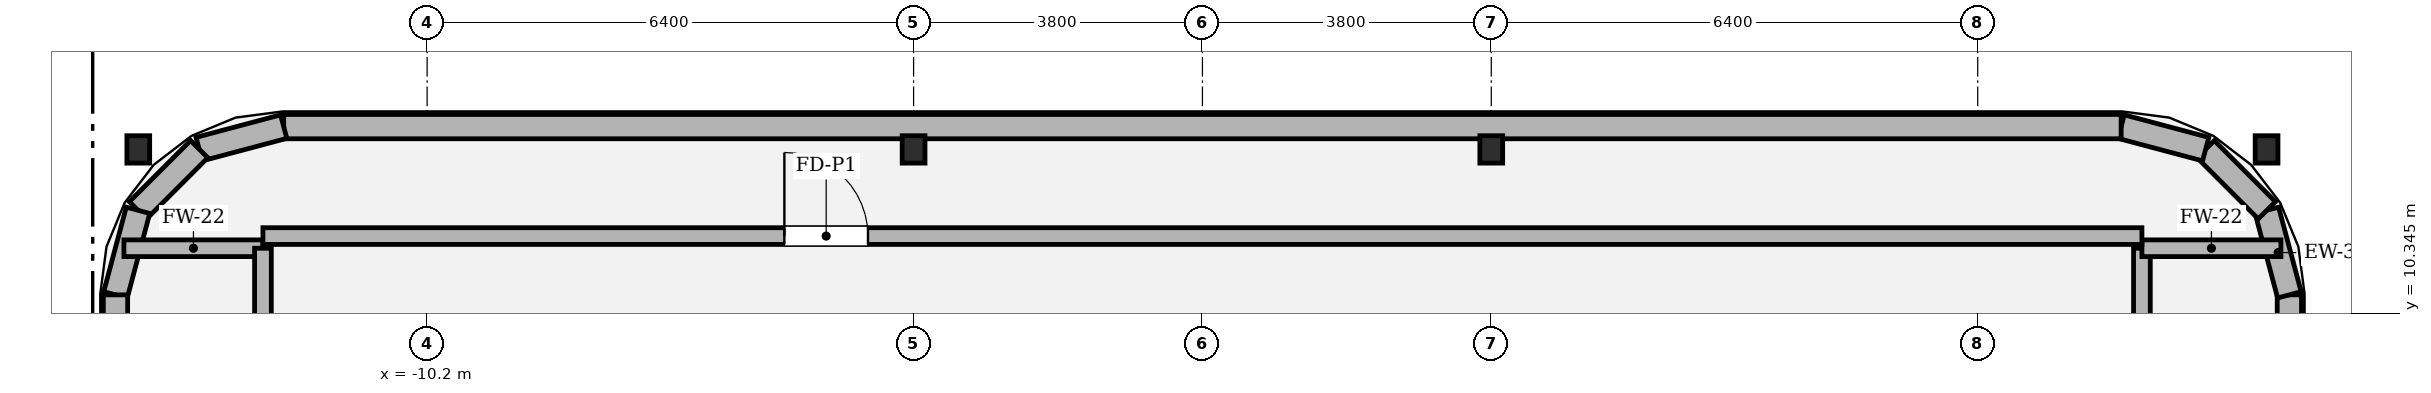
"""IFC4 building model, lengths in metres.
Left out: names, types, materials, properties, quantities, classifications, styles, units other than length and angle.
Written with IfcOpenShell. Run it as: python <this file> out.ifc"""

import sys

from ifc_helpers import new_model, si_unit, direction, frame, frame_2d, origin, origin_2d, place, context, subcontext, project, spatial, rectangle, i_section, extrude, element, fill, save


model = new_model("IFC4")
c1 = context("Model", 3, precision=1e-05, world=origin(), true_north=direction((0.0, 1.0)))
c2 = subcontext(c1, "Body", "Model", "MODEL_VIEW")
j1 = project(units=[si_unit("LENGTHUNIT", "METRE"), si_unit("PLANEANGLEUNIT", "RADIAN")], contexts=[c1])
p1 = place(None, origin())
s1 = spatial("IfcSite", under=j1, at=p1, CompositionType="ELEMENT")
p2 = place(p1, origin())
s2 = spatial("IfcBuilding", under=s1, at=p2, CompositionType="ELEMENT")
p3 = place(p2, frame((0.0, 0.0, 366.3)))
s3 = spatial("IfcBuildingStorey", under=s2, at=p3, CompositionType="ELEMENT", Elevation=366.3)
for number, where, z_axis, x_axis in (
    (1, (-3.8, 12.5, 0.0), (0.0, 0.0, 1.0), (1.0, 0.0, 0.0)),
    (2, (3.8, 12.5, 0.0), (0.0, 0.0, 1.0), (1.0, 0.0, 0.0)),
    (3, (14.0, 12.5, 0.0), (0.0, 0.0, 1.0), (1.0, 0.0, 0.0)),
    (4, (-14.0, 12.5, 0.0), (0.0, 0.0, 1.0), (1.0, 0.0, 0.0)),
):
    element("IfcColumn", number, at=place(p3, frame(where, z_axis=z_axis, x_axis=x_axis)), inside=s3, PredefinedType="COLUMN", context=c2, shape_type="SweptSolid", body=[
        extrude(i_section(OverallWidth=0.3, OverallDepth=0.36, WebThickness=0.012, FlangeThickness=0.022, FilletRadius=0.018, at=origin_2d()), origin(), (0.0, 0.0, 1.0), 4.498),
    ])
p4 = place(p3, frame((14.3, -10.587, 0.0), z_axis=(0.0, 0.0, 1.0), x_axis=(0.0, 1.0, 0.0)))
e5 = element("IfcWall", 5, at=p4, inside=s3, PredefinedType="SOLIDWALL", context=c2, shape_type="SweptSolid", body=[
    extrude(rectangle(XDim=21.174, YDim=0.32, at=frame_2d((10.587, 0.0))), origin(), (0.0, 0.0, 1.0), 3.924),
])
p5 = place(p3, frame((14.3, 10.587, 0.0), z_axis=(0.0, 0.0, 1.0), x_axis=(-0.25727979053, 0.966336954372, 0.0)))
e6 = element("IfcWall", 6, at=p5, inside=s3, PredefinedType="SOLIDWALL", context=c2, shape_type="SweptSolid", body=[
    extrude(rectangle(XDim=1.151, YDim=0.32, at=frame_2d((0.576, 0.0))), origin(), (0.0, 0.0, 1.0), 3.924),
])
p6 = place(p3, frame((14.004, 11.699, 0.0), z_axis=(0.0, 0.0, 1.0), x_axis=(-0.707106781187, 0.707106781187, 0.0)))
e7 = element("IfcWall", 7, at=p6, inside=s3, PredefinedType="SOLIDWALL", context=c2, shape_type="SweptSolid", body=[
    extrude(rectangle(XDim=1.138, YDim=0.32, at=frame_2d((0.569, 0.0))), origin(), (0.0, 0.0, 1.0), 3.924),
])
p7 = place(p3, frame((13.199, 12.504, 0.0), z_axis=(0.0, 0.0, 1.0), x_axis=(-0.966336954372, 0.25727979053, 0.0)))
e8 = element("IfcWall", 8, at=p7, inside=s3, PredefinedType="SOLIDWALL", context=c2, shape_type="SweptSolid", body=[
    extrude(rectangle(XDim=1.151, YDim=0.32, at=frame_2d((0.576, 0.0))), origin(), (0.0, 0.0, 1.0), 3.924),
])
p8 = place(p3, frame((12.087, 12.8, 0.0), z_axis=(0.0, 0.0, 1.0), x_axis=(-1.0, 0.0, 0.0)))
e9 = element("IfcWall", 9, at=p8, inside=s3, PredefinedType="SOLIDWALL", context=c2, shape_type="SweptSolid", body=[
    extrude(rectangle(XDim=24.174, YDim=0.32, at=frame_2d((12.087, 0.0))), origin(), (0.0, 0.0, 1.0), 3.924),
])
p9 = place(p3, frame((-12.087, 12.8, 0.0), z_axis=(0.0, 0.0, 1.0), x_axis=(-0.966336954372, -0.25727979053, 0.0)))
e10 = element("IfcWall", 10, at=p9, inside=s3, PredefinedType="SOLIDWALL", context=c2, shape_type="SweptSolid", body=[
    extrude(rectangle(XDim=1.151, YDim=0.32, at=frame_2d((0.576, 0.0))), origin(), (0.0, 0.0, 1.0), 3.924),
])
p10 = place(p3, frame((-13.199, 12.504, 0.0), z_axis=(0.0, 0.0, 1.0), x_axis=(-0.707106781187, -0.707106781187, 0.0)))
e11 = element("IfcWall", 11, at=p10, inside=s3, PredefinedType="SOLIDWALL", context=c2, shape_type="SweptSolid", body=[
    extrude(rectangle(XDim=1.138, YDim=0.32, at=frame_2d((0.569, 0.0))), origin(), (0.0, 0.0, 1.0), 3.924),
])
p11 = place(p3, frame((-14.004, 11.699, 0.0), z_axis=(0.0, 0.0, 1.0), x_axis=(-0.25727979053, -0.966336954372, 0.0)))
e12 = element("IfcWall", 12, at=p11, inside=s3, PredefinedType="SOLIDWALL", context=c2, shape_type="SweptSolid", body=[
    extrude(rectangle(XDim=1.151, YDim=0.32, at=frame_2d((0.576, 0.0))), origin(), (0.0, 0.0, 1.0), 3.924),
])
p12 = place(p3, frame((-14.3, 10.587, 0.0), z_axis=(0.0, 0.0, 1.0), x_axis=(0.0, -1.0, 0.0)))
e13 = element("IfcWall", 13, at=p12, inside=s3, PredefinedType="SOLIDWALL", context=c2, shape_type="SweptSolid", body=[
    extrude(rectangle(XDim=21.174, YDim=0.32, at=frame_2d((10.587, 0.0))), origin(), (0.0, 0.0, 1.0), 3.924),
])
p13 = place(p3, frame((-14.189, 11.2, 0.0), z_axis=(0.0, 0.0, 1.0), x_axis=(1.0, 0.0, 0.0)))
e14 = element("IfcWall", 14, at=p13, inside=s3, PredefinedType="SOLIDWALL", context=c2, shape_type="SweptSolid", body=[
    extrude(rectangle(XDim=1.829, YDim=0.22, at=frame_2d((0.915, 0.0))), origin(), (0.0, 0.0, 1.0), 3.924),
])
p14 = place(p3, frame((-12.36, 11.2, 0.0), z_axis=(0.0, 0.0, 1.0), x_axis=(0.0, -1.0, 0.0)))
e15 = element("IfcWall", 15, at=p14, inside=s3, PredefinedType="SOLIDWALL", context=c2, shape_type="SweptSolid", body=[
    extrude(rectangle(XDim=22.4, YDim=0.22, at=frame_2d((11.2, 0.0))), origin(), (0.0, 0.0, 1.0), 3.924),
])
p15 = place(p14, frame((10.65, 0.0, 0.0)))
e16 = element("IfcOpeningElement", 16, at=p15, cuts=e15, PredefinedType="OPENING", context=c2, shape_type="SweptSolid", body=[
    extrude(rectangle(XDim=1.1, YDim=2.2, at=frame_2d((0.55, 1.1))), frame((0.0, 0.12, 0.0), z_axis=(0.0, -1.0, 0.0), x_axis=(1.0, 0.0, 0.0)), (0.0, 0.0, 1.0), 0.24),
])
p16 = place(p3, frame((12.36, -11.2, 0.0), z_axis=(0.0, 0.0, 1.0), x_axis=(0.0, 1.0, 0.0)))
e17 = element("IfcWall", 17, at=p16, inside=s3, PredefinedType="SOLIDWALL", context=c2, shape_type="SweptSolid", body=[
    extrude(rectangle(XDim=22.4, YDim=0.22, at=frame_2d((11.2, 0.0))), origin(), (0.0, 0.0, 1.0), 3.924),
])
p17 = place(p16, frame((10.65, 0.0, 0.0)))
e18 = element("IfcOpeningElement", 18, at=p17, cuts=e17, PredefinedType="OPENING", context=c2, shape_type="SweptSolid", body=[
    extrude(rectangle(XDim=1.1, YDim=2.2, at=frame_2d((0.55, 1.1))), frame((0.0, 0.12, 0.0), z_axis=(0.0, -1.0, 0.0), x_axis=(1.0, 0.0, 0.0)), (0.0, 0.0, 1.0), 0.24),
])
p18 = place(p3, frame((12.36, 11.2, 0.0), z_axis=(0.0, 0.0, 1.0), x_axis=(1.0, 0.0, 0.0)))
e19 = element("IfcWall", 19, at=p18, inside=s3, PredefinedType="SOLIDWALL", context=c2, shape_type="SweptSolid", body=[
    extrude(rectangle(XDim=1.829, YDim=0.22, at=frame_2d((0.915, 0.0))), origin(), (0.0, 0.0, 1.0), 3.924),
])
p19 = place(p3, frame((12.36, 11.36, 0.0), z_axis=(0.0, 0.0, 1.0), x_axis=(-1.0, 0.0, 0.0)))
e20 = element("IfcWall", 20, at=p19, inside=s3, PredefinedType="SOLIDWALL", context=c2, shape_type="SweptSolid", body=[
    extrude(rectangle(XDim=24.72, YDim=0.22, at=frame_2d((12.36, 0.0))), origin(), (0.0, 0.0, 1.0), 3.924),
])
p20 = place(p19, frame((16.76, 0.0, 0.0)))
e21 = element("IfcOpeningElement", 21, at=p20, cuts=e20, PredefinedType="OPENING", context=c2, shape_type="SweptSolid", body=[
    extrude(rectangle(XDim=1.1, YDim=2.2, at=frame_2d((0.55, 1.1))), frame((0.0, 0.12, 0.0), z_axis=(0.0, -1.0, 0.0), x_axis=(1.0, 0.0, 0.0)), (0.0, 0.0, 1.0), 0.24),
])
p21 = place(p20, origin())
e22 = element("IfcDoor", 22, at=p21, inside=s3, OperationType="SINGLE_SWING_RIGHT", PredefinedType="DOOR", context=c2, shape_type="SweptSolid", body=[
    extrude(rectangle(XDim=1.1, YDim=2.2, at=frame_2d((0.55, 1.1))), frame((0.0, 0.025, 0.0), z_axis=(0.0, -1.0, 0.0), x_axis=(1.0, 0.0, 0.0)), (0.0, 0.0, 1.0), 0.05),
])
fill(e21, e22)
save(model, sys.argv[1])
